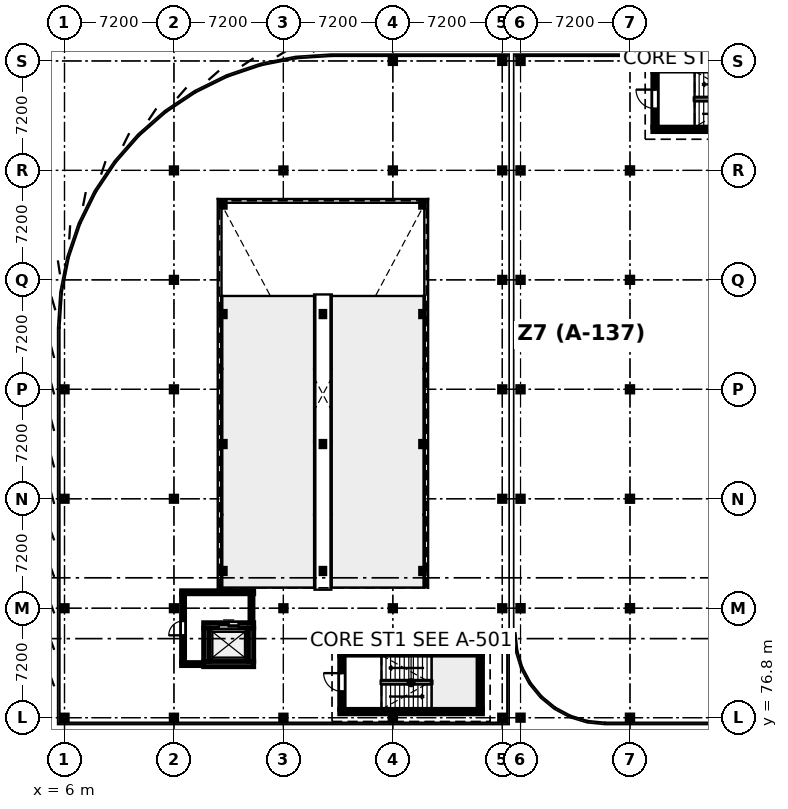
"""IFC4 building model, lengths in metres.
Left out: names, types, materials, properties, quantities, classifications, styles, units other than length and angle.
Written with IfcOpenShell. Run it as: python <this file> out.ifc"""

import sys

from ifc_helpers import new_model, si_unit, direction, frame, frame_2d, origin, origin_2d, place, context, subcontext, project, spatial, rectangle, i_section, extrude, element, fill, save


model = new_model("IFC4")
c1 = context("Model", 3, precision=1e-05, world=origin(), true_north=direction((0.0, 1.0)))
c2 = subcontext(c1, "Body", "Model", "MODEL_VIEW")
j1 = project(units=[si_unit("LENGTHUNIT", "METRE"), si_unit("PLANEANGLEUNIT", "RADIAN")], contexts=[c1])
p1 = place(None, origin())
s1 = spatial("IfcSite", under=j1, at=p1, CompositionType="ELEMENT")
p2 = place(p1, origin())
s2 = spatial("IfcBuilding", under=s1, at=p2, CompositionType="ELEMENT")
p3 = place(p2, frame((0.0, 0.0, 13.2)))
s3 = spatial("IfcBuildingStorey", under=s2, at=p3, CompositionType="ELEMENT", Elevation=13.2)
for number, where, z_axis, x_axis in (
    (1, (6.0, 76.8, 0.0), (0.0, 0.0, 1.0), (1.0, 0.0, 0.0)),
    (2, (6.0, 84.0, 0.0), (0.0, 0.0, 1.0), (1.0, 0.0, 0.0)),
    (3, (6.0, 91.2, 0.0), (0.0, 0.0, 1.0), (1.0, 0.0, 0.0)),
    (4, (6.0, 98.4, 0.0), (0.0, 0.0, 1.0), (1.0, 0.0, 0.0)),
    (5, (13.2, 76.8, 0.0), (0.0, 0.0, 1.0), (1.0, 0.0, 0.0)),
    (6, (13.2, 84.0, 0.0), (0.0, 0.0, 1.0), (1.0, 0.0, 0.0)),
    (7, (13.2, 91.2, 0.0), (0.0, 0.0, 1.0), (1.0, 0.0, 0.0)),
    (8, (13.2, 98.4, 0.0), (0.0, 0.0, 1.0), (1.0, 0.0, 0.0)),
    (9, (13.2, 105.6, 0.0), (0.0, 0.0, 1.0), (1.0, 0.0, 0.0)),
    (10, (13.2, 112.8, 0.0), (0.0, 0.0, 1.0), (1.0, 0.0, 0.0)),
    (11, (20.4, 76.8, 0.0), (0.0, 0.0, 1.0), (1.0, 0.0, 0.0)),
    (12, (20.4, 84.0, 0.0), (0.0, 0.0, 1.0), (1.0, 0.0, 0.0)),
    (13, (20.4, 112.8, 0.0), (0.0, 0.0, 1.0), (1.0, 0.0, 0.0)),
    (14, (27.6, 76.8, 0.0), (0.0, 0.0, 1.0), (1.0, 0.0, 0.0)),
    (15, (27.6, 84.0, 0.0), (0.0, 0.0, 1.0), (1.0, 0.0, 0.0)),
    (16, (27.6, 112.8, 0.0), (0.0, 0.0, 1.0), (1.0, 0.0, 0.0)),
    (17, (27.6, 120.0, 0.0), (0.0, 0.0, 1.0), (1.0, 0.0, 0.0)),
    (18, (34.8, 76.8, 0.0), (0.0, 0.0, 1.0), (1.0, 0.0, 0.0)),
    (19, (34.8, 84.0, 0.0), (0.0, 0.0, 1.0), (1.0, 0.0, 0.0)),
    (20, (34.8, 91.2, 0.0), (0.0, 0.0, 1.0), (1.0, 0.0, 0.0)),
    (21, (34.8, 98.4, 0.0), (0.0, 0.0, 1.0), (1.0, 0.0, 0.0)),
    (22, (34.8, 105.6, 0.0), (0.0, 0.0, 1.0), (1.0, 0.0, 0.0)),
    (23, (34.8, 112.8, 0.0), (0.0, 0.0, 1.0), (1.0, 0.0, 0.0)),
    (24, (34.8, 120.0, 0.0), (0.0, 0.0, 1.0), (1.0, 0.0, 0.0)),
):
    element("IfcColumn", number, at=place(p3, frame(where, z_axis=z_axis, x_axis=x_axis)), inside=s3, PredefinedType="COLUMN", context=c2, shape_type="SweptSolid", body=[
        extrude(i_section(OverallWidth=0.368, OverallDepth=0.356, WebThickness=0.011, FlangeThickness=0.018, FilletRadius=0.015, at=origin_2d()), origin(), (0.0, 0.0, 1.0), 3.9),
    ])
for number, where, z_axis, x_axis in (
    (25, (16.45, 86.45, 0.0), (0.0, 0.0, 1.0), (1.0, 0.0, 0.0)),
    (26, (23.0, 86.45, 0.0), (0.0, 0.0, 1.0), (1.0, 0.0, 0.0)),
    (27, (29.55, 86.45, 0.0), (0.0, 0.0, 1.0), (1.0, 0.0, 0.0)),
    (28, (16.45, 94.8, 0.0), (0.0, 0.0, 1.0), (1.0, 0.0, 0.0)),
    (29, (23.0, 94.8, 0.0), (0.0, 0.0, 1.0), (1.0, 0.0, 0.0)),
    (30, (29.55, 94.8, 0.0), (0.0, 0.0, 1.0), (1.0, 0.0, 0.0)),
    (31, (16.45, 103.35, 0.0), (0.0, 0.0, 1.0), (1.0, 0.0, 0.0)),
    (32, (23.0, 103.35, 0.0), (0.0, 0.0, 1.0), (1.0, 0.0, 0.0)),
    (33, (29.55, 103.35, 0.0), (0.0, 0.0, 1.0), (1.0, 0.0, 0.0)),
    (34, (16.45, 110.55, 0.0), (0.0, 0.0, 1.0), (1.0, 0.0, 0.0)),
    (35, (29.55, 110.55, 0.0), (0.0, 0.0, 1.0), (1.0, 0.0, 0.0)),
):
    element("IfcColumn", number, at=place(p3, frame(where, z_axis=z_axis, x_axis=x_axis)), inside=s3, PredefinedType="COLUMN", context=c2, shape_type="SweptSolid", body=[
        extrude(i_section(OverallWidth=0.257, OverallDepth=0.363, WebThickness=0.013, FlangeThickness=0.022, FilletRadius=0.015, at=origin_2d()), origin(), (0.0, 0.0, 1.0), 3.9),
    ])
p4 = place(p3, frame((36.0, 76.8, 0.0), z_axis=(0.0, 0.0, 1.0), x_axis=(1.0, 0.0, 0.0)))
e36 = element("IfcColumn", 36, at=p4, inside=s3, PredefinedType="COLUMN", context=c2, shape_type="SweptSolid", body=[
    extrude(i_section(OverallWidth=0.371, OverallDepth=0.363, WebThickness=0.013, FlangeThickness=0.022, FilletRadius=0.015, at=origin_2d()), origin(), (0.0, 0.0, 1.0), 3.9),
])
p5 = place(p3, frame((36.0, 84.0, 0.0), z_axis=(0.0, 0.0, 1.0), x_axis=(1.0, 0.0, 0.0)))
e37 = element("IfcColumn", 37, at=p5, inside=s3, PredefinedType="COLUMN", context=c2, shape_type="SweptSolid", body=[
    extrude(i_section(OverallWidth=0.373, OverallDepth=0.373, WebThickness=0.016, FlangeThickness=0.026, FilletRadius=0.015, at=origin_2d()), origin(), (0.0, 0.0, 1.0), 3.9),
])
for number, where, z_axis, x_axis in (
    (38, (36.0, 91.2, 0.0), (0.0, 0.0, 1.0), (1.0, 0.0, 0.0)),
    (39, (36.0, 98.4, 0.0), (0.0, 0.0, 1.0), (1.0, 0.0, 0.0)),
    (40, (36.0, 105.6, 0.0), (0.0, 0.0, 1.0), (1.0, 0.0, 0.0)),
):
    element("IfcColumn", number, at=place(p3, frame(where, z_axis=z_axis, x_axis=x_axis)), inside=s3, PredefinedType="COLUMN", context=c2, shape_type="SweptSolid", body=[
        extrude(i_section(OverallWidth=0.371, OverallDepth=0.363, WebThickness=0.013, FlangeThickness=0.022, FilletRadius=0.015, at=origin_2d()), origin(), (0.0, 0.0, 1.0), 3.9),
    ])
p6 = place(p3, frame((36.0, 112.8, 0.0), z_axis=(0.0, 0.0, 1.0), x_axis=(1.0, 0.0, 0.0)))
e41 = element("IfcColumn", 41, at=p6, inside=s3, PredefinedType="COLUMN", context=c2, shape_type="SweptSolid", body=[
    extrude(i_section(OverallWidth=0.373, OverallDepth=0.373, WebThickness=0.016, FlangeThickness=0.026, FilletRadius=0.015, at=origin_2d()), origin(), (0.0, 0.0, 1.0), 3.9),
])
for number, where, z_axis, x_axis in (
    (42, (36.0, 120.0, 0.0), (0.0, 0.0, 1.0), (1.0, 0.0, 0.0)),
    (43, (43.2, 76.8, 0.0), (0.0, 0.0, 1.0), (1.0, 0.0, 0.0)),
):
    element("IfcColumn", number, at=place(p3, frame(where, z_axis=z_axis, x_axis=x_axis)), inside=s3, PredefinedType="COLUMN", context=c2, shape_type="SweptSolid", body=[
        extrude(i_section(OverallWidth=0.371, OverallDepth=0.363, WebThickness=0.013, FlangeThickness=0.022, FilletRadius=0.015, at=origin_2d()), origin(), (0.0, 0.0, 1.0), 3.9),
    ])
p7 = place(p3, frame((43.2, 84.0, 0.0), z_axis=(0.0, 0.0, 1.0), x_axis=(1.0, 0.0, 0.0)))
e44 = element("IfcColumn", 44, at=p7, inside=s3, PredefinedType="COLUMN", context=c2, shape_type="SweptSolid", body=[
    extrude(i_section(OverallWidth=0.373, OverallDepth=0.373, WebThickness=0.016, FlangeThickness=0.026, FilletRadius=0.015, at=origin_2d()), origin(), (0.0, 0.0, 1.0), 3.9),
])
for number, where, z_axis, x_axis in (
    (45, (43.2, 91.2, 0.0), (0.0, 0.0, 1.0), (1.0, 0.0, 0.0)),
    (46, (43.2, 98.4, 0.0), (0.0, 0.0, 1.0), (1.0, 0.0, 0.0)),
    (47, (43.2, 105.6, 0.0), (0.0, 0.0, 1.0), (1.0, 0.0, 0.0)),
):
    element("IfcColumn", number, at=place(p3, frame(where, z_axis=z_axis, x_axis=x_axis)), inside=s3, PredefinedType="COLUMN", context=c2, shape_type="SweptSolid", body=[
        extrude(i_section(OverallWidth=0.371, OverallDepth=0.363, WebThickness=0.013, FlangeThickness=0.022, FilletRadius=0.015, at=origin_2d()), origin(), (0.0, 0.0, 1.0), 3.9),
    ])
p8 = place(p3, frame((43.2, 112.8, 0.0), z_axis=(0.0, 0.0, 1.0), x_axis=(1.0, 0.0, 0.0)))
e48 = element("IfcColumn", 48, at=p8, inside=s3, PredefinedType="COLUMN", context=c2, shape_type="SweptSolid", body=[
    extrude(i_section(OverallWidth=0.373, OverallDepth=0.373, WebThickness=0.016, FlangeThickness=0.026, FilletRadius=0.015, at=origin_2d()), origin(), (0.0, 0.0, 1.0), 3.9),
])
p9 = place(p3, frame((43.2, 120.0, 0.0), z_axis=(0.0, 0.0, 1.0), x_axis=(1.0, 0.0, 0.0)))
e49 = element("IfcColumn", 49, at=p9, inside=s3, PredefinedType="COLUMN", context=c2, shape_type="SweptSolid", body=[
    extrude(i_section(OverallWidth=0.371, OverallDepth=0.363, WebThickness=0.013, FlangeThickness=0.022, FilletRadius=0.015, at=origin_2d()), origin(), (0.0, 0.0, 1.0), 3.9),
])
for number, where, z_axis, x_axis in (
    (50, (33.5, 77.2, 0.0), (0.0, 0.0, 1.0), (-1.0, 0.0, 0.0)),
    (51, (24.1, 81.06, 0.0), (0.0, 0.0, 1.0), (1.0, 0.0, 0.0)),
):
    element("IfcWall", number, at=place(p3, frame(where, z_axis=z_axis, x_axis=x_axis)), inside=s3, PredefinedType="SOLIDWALL", context=c2, shape_type="SweptSolid", body=[
        extrude(rectangle(XDim=9.4, YDim=0.3, at=frame_2d((4.7, 0.0))), origin(), (0.0, 0.0, 1.0), 3.65),
    ])
p10 = place(p3, frame((24.25, 77.35, 0.0), z_axis=(0.0, 0.0, 1.0), x_axis=(0.0, 1.0, 0.0)))
e52 = element("IfcWall", 52, at=p10, inside=s3, PredefinedType="SOLIDWALL", context=c2, shape_type="SweptSolid", body=[
    extrude(rectangle(XDim=3.56, YDim=0.3, at=frame_2d((1.78, 0.0))), origin(), (0.0, 0.0, 1.0), 3.65),
])
p11 = place(p10, frame((1.18, 0.0, 0.0)))
e53 = element("IfcOpeningElement", 53, at=p11, cuts=e52, PredefinedType="OPENING", context=c2, shape_type="SweptSolid", body=[
    extrude(rectangle(XDim=1.2, YDim=2.2, at=frame_2d((0.6, 1.1))), frame((0.0, 0.16, 0.0), z_axis=(0.0, -1.0, 0.0), x_axis=(1.0, 0.0, 0.0)), (0.0, 0.0, 1.0), 0.32),
])
p12 = place(p3, frame((33.35, 80.91, 0.0), z_axis=(0.0, 0.0, 1.0), x_axis=(0.0, -1.0, 0.0)))
e54 = element("IfcWall", 54, at=p12, inside=s3, PredefinedType="SOLIDWALL", context=c2, shape_type="SweptSolid", body=[
    extrude(rectangle(XDim=3.56, YDim=0.3, at=frame_2d((1.78, 0.0))), origin(), (0.0, 0.0, 1.0), 3.65),
])
for number, where, z_axis, x_axis in (
    (55, (54.1, 115.5, 0.0), (0.0, 0.0, 1.0), (-1.0, 0.0, 0.0)),
    (56, (44.7, 119.48, 0.0), (0.0, 0.0, 1.0), (1.0, 0.0, 0.0)),
):
    element("IfcWall", number, at=place(p3, frame(where, z_axis=z_axis, x_axis=x_axis)), inside=s3, PredefinedType="SOLIDWALL", context=c2, shape_type="SweptSolid", body=[
        extrude(rectangle(XDim=9.4, YDim=0.3, at=frame_2d((4.7, 0.0))), origin(), (0.0, 0.0, 1.0), 3.66),
    ])
p13 = place(p3, frame((44.85, 115.65, 0.0), z_axis=(0.0, 0.0, 1.0), x_axis=(0.0, 1.0, 0.0)))
e57 = element("IfcWall", 57, at=p13, inside=s3, PredefinedType="SOLIDWALL", context=c2, shape_type="SweptSolid", body=[
    extrude(rectangle(XDim=3.68, YDim=0.3, at=frame_2d((1.84, 0.0))), origin(), (0.0, 0.0, 1.0), 3.66),
])
p14 = place(p13, frame((1.215, 0.0, 0.0)))
e58 = element("IfcOpeningElement", 58, at=p14, cuts=e57, PredefinedType="OPENING", context=c2, shape_type="SweptSolid", body=[
    extrude(rectangle(XDim=1.25, YDim=2.2, at=frame_2d((0.625, 1.1))), frame((0.0, 0.16, 0.0), z_axis=(0.0, -1.0, 0.0), x_axis=(1.0, 0.0, 0.0)), (0.0, 0.0, 1.0), 0.32),
])
p15 = place(p3, frame((18.45, 80.325, 0.0), z_axis=(0.0, 0.0, 1.0), x_axis=(-1.0, 0.0, 0.0)))
e59 = element("IfcWall", 59, at=p15, inside=s3, PredefinedType="SHEAR", context=c2, shape_type="SweptSolid", body=[
    extrude(rectangle(XDim=3.3, YDim=0.35, at=frame_2d((1.65, 0.0))), origin(), (0.0, 0.0, 1.0), 3.65),
])
p16 = place(p3, frame((15.15, 82.875, 0.0), z_axis=(0.0, 0.0, 1.0), x_axis=(1.0, 0.0, 0.0)))
e60 = element("IfcWall", 60, at=p16, inside=s3, PredefinedType="SHEAR", context=c2, shape_type="SweptSolid", body=[
    extrude(rectangle(XDim=3.3, YDim=0.35, at=frame_2d((1.65, 0.0))), origin(), (0.0, 0.0, 1.0), 3.65),
])
p17 = place(p16, frame((1.0, 0.0, 0.0)))
e61 = element("IfcOpeningElement", 61, at=p17, cuts=e60, PredefinedType="OPENING", context=c2, shape_type="SweptSolid", body=[
    extrude(rectangle(XDim=1.3, YDim=2.2, at=frame_2d((0.65, 1.1))), frame((0.0, 0.185, 0.0), z_axis=(0.0, -1.0, 0.0), x_axis=(1.0, 0.0, 0.0)), (0.0, 0.0, 1.0), 0.37),
])
for number, where, z_axis, x_axis in (
    (62, (15.325, 80.5, 0.0), (0.0, 0.0, 1.0), (0.0, 1.0, 0.0)),
    (63, (18.275, 82.7, 0.0), (0.0, 0.0, 1.0), (0.0, -1.0, 0.0)),
):
    element("IfcWall", number, at=place(p3, frame(where, z_axis=z_axis, x_axis=x_axis)), inside=s3, PredefinedType="SHEAR", context=c2, shape_type="SweptSolid", body=[
        extrude(rectangle(XDim=2.2, YDim=0.35, at=frame_2d((1.1, 0.0))), origin(), (0.0, 0.0, 1.0), 3.65),
    ])
p18 = place(p3, frame((13.698, 85.05, 0.0), z_axis=(0.0, 0.0, 1.0), x_axis=(1.0, 0.0, 0.0)))
e64 = element("IfcWall", 64, at=p18, inside=s3, PredefinedType="PARTITIONING", context=c2, shape_type="SweptSolid", body=[
    extrude(rectangle(XDim=4.752, YDim=0.205, at=frame_2d((2.376, 0.0))), origin(), (0.0, 0.0, 1.0), 3.018),
])
p19 = place(p3, frame((15.148, 80.325, 0.0), z_axis=(0.0, 0.0, 1.0), x_axis=(-1.0, 0.0, 0.0)))
e65 = element("IfcWall", 65, at=p19, inside=s3, PredefinedType="PARTITIONING", context=c2, shape_type="SweptSolid", body=[
    extrude(rectangle(XDim=1.45, YDim=0.205, at=frame_2d((0.725, 0.0))), origin(), (0.0, 0.0, 1.0), 3.018),
])
p20 = place(p3, frame((13.8, 80.43, 0.0), z_axis=(0.0, 0.0, 1.0), x_axis=(0.0, 1.0, 0.0)))
e66 = element("IfcWall", 66, at=p20, inside=s3, PredefinedType="PARTITIONING", context=c2, shape_type="SweptSolid", body=[
    extrude(rectangle(XDim=4.516, YDim=0.205, at=frame_2d((2.258, 0.0))), origin(), (0.0, 0.0, 1.0), 3.018),
])
p21 = place(p20, frame((1.788, 0.0, 0.0)))
e67 = element("IfcOpeningElement", 67, at=p21, cuts=e66, PredefinedType="OPENING", context=c2, shape_type="SweptSolid", body=[
    extrude(rectangle(XDim=0.94, YDim=2.1, at=frame_2d((0.47, 1.05))), frame((0.0, 0.113, 0.0), z_axis=(0.0, -1.0, 0.0), x_axis=(1.0, 0.0, 0.0)), (0.0, 0.0, 1.0), 0.225),
])
p22 = place(p3, frame((18.3, 84.946, 0.0), z_axis=(0.0, 0.0, 1.0), x_axis=(0.0, -1.0, 0.0)))
e68 = element("IfcWall", 68, at=p22, inside=s3, PredefinedType="PARTITIONING", context=c2, shape_type="SweptSolid", body=[
    extrude(rectangle(XDim=1.894, YDim=0.205, at=frame_2d((0.947, 0.0))), origin(), (0.0, 0.0, 1.0), 3.018),
])
p23 = place(p11, origin())
e69 = element("IfcDoor", 69, at=p23, inside=s3, OperationType="SINGLE_SWING_RIGHT", PredefinedType="DOOR", context=c2, shape_type="SweptSolid", body=[
    extrude(rectangle(XDim=1.2, YDim=2.2, at=frame_2d((0.6, 1.1))), frame((0.0, 0.025, 0.0), z_axis=(0.0, -1.0, 0.0), x_axis=(1.0, 0.0, 0.0)), (0.0, 0.0, 1.0), 0.05),
])
fill(e53, e69)
p24 = place(p14, origin())
e70 = element("IfcDoor", 70, at=p24, inside=s3, OperationType="SINGLE_SWING_RIGHT", PredefinedType="DOOR", context=c2, shape_type="SweptSolid", body=[
    extrude(rectangle(XDim=1.25, YDim=2.2, at=frame_2d((0.625, 1.1))), frame((0.0, 0.025, 0.0), z_axis=(0.0, -1.0, 0.0), x_axis=(1.0, 0.0, 0.0)), (0.0, 0.0, 1.0), 0.05),
])
fill(e58, e70)
p25 = place(p17, origin())
e71 = element("IfcDoor", 71, at=p25, inside=s3, OperationType="DOUBLE_DOOR_SLIDING", PredefinedType="DOOR", context=c2, shape_type="SweptSolid", body=[
    extrude(rectangle(XDim=1.3, YDim=2.2, at=frame_2d((0.65, 1.1))), frame((0.0, 0.025, 0.0), z_axis=(0.0, -1.0, 0.0), x_axis=(1.0, 0.0, 0.0)), (0.0, 0.0, 1.0), 0.05),
])
fill(e61, e71)
p26 = place(p21, origin())
e72 = element("IfcDoor", 72, at=p26, inside=s3, OperationType="SINGLE_SWING_LEFT", PredefinedType="DOOR", context=c2, shape_type="SweptSolid", body=[
    extrude(rectangle(XDim=0.94, YDim=2.1, at=frame_2d((0.47, 1.05))), frame((0.0, 0.025, 0.0), z_axis=(0.0, -1.0, 0.0), x_axis=(1.0, 0.0, 0.0)), (0.0, 0.0, 1.0), 0.05),
])
fill(e67, e72)
save(model, sys.argv[1])
